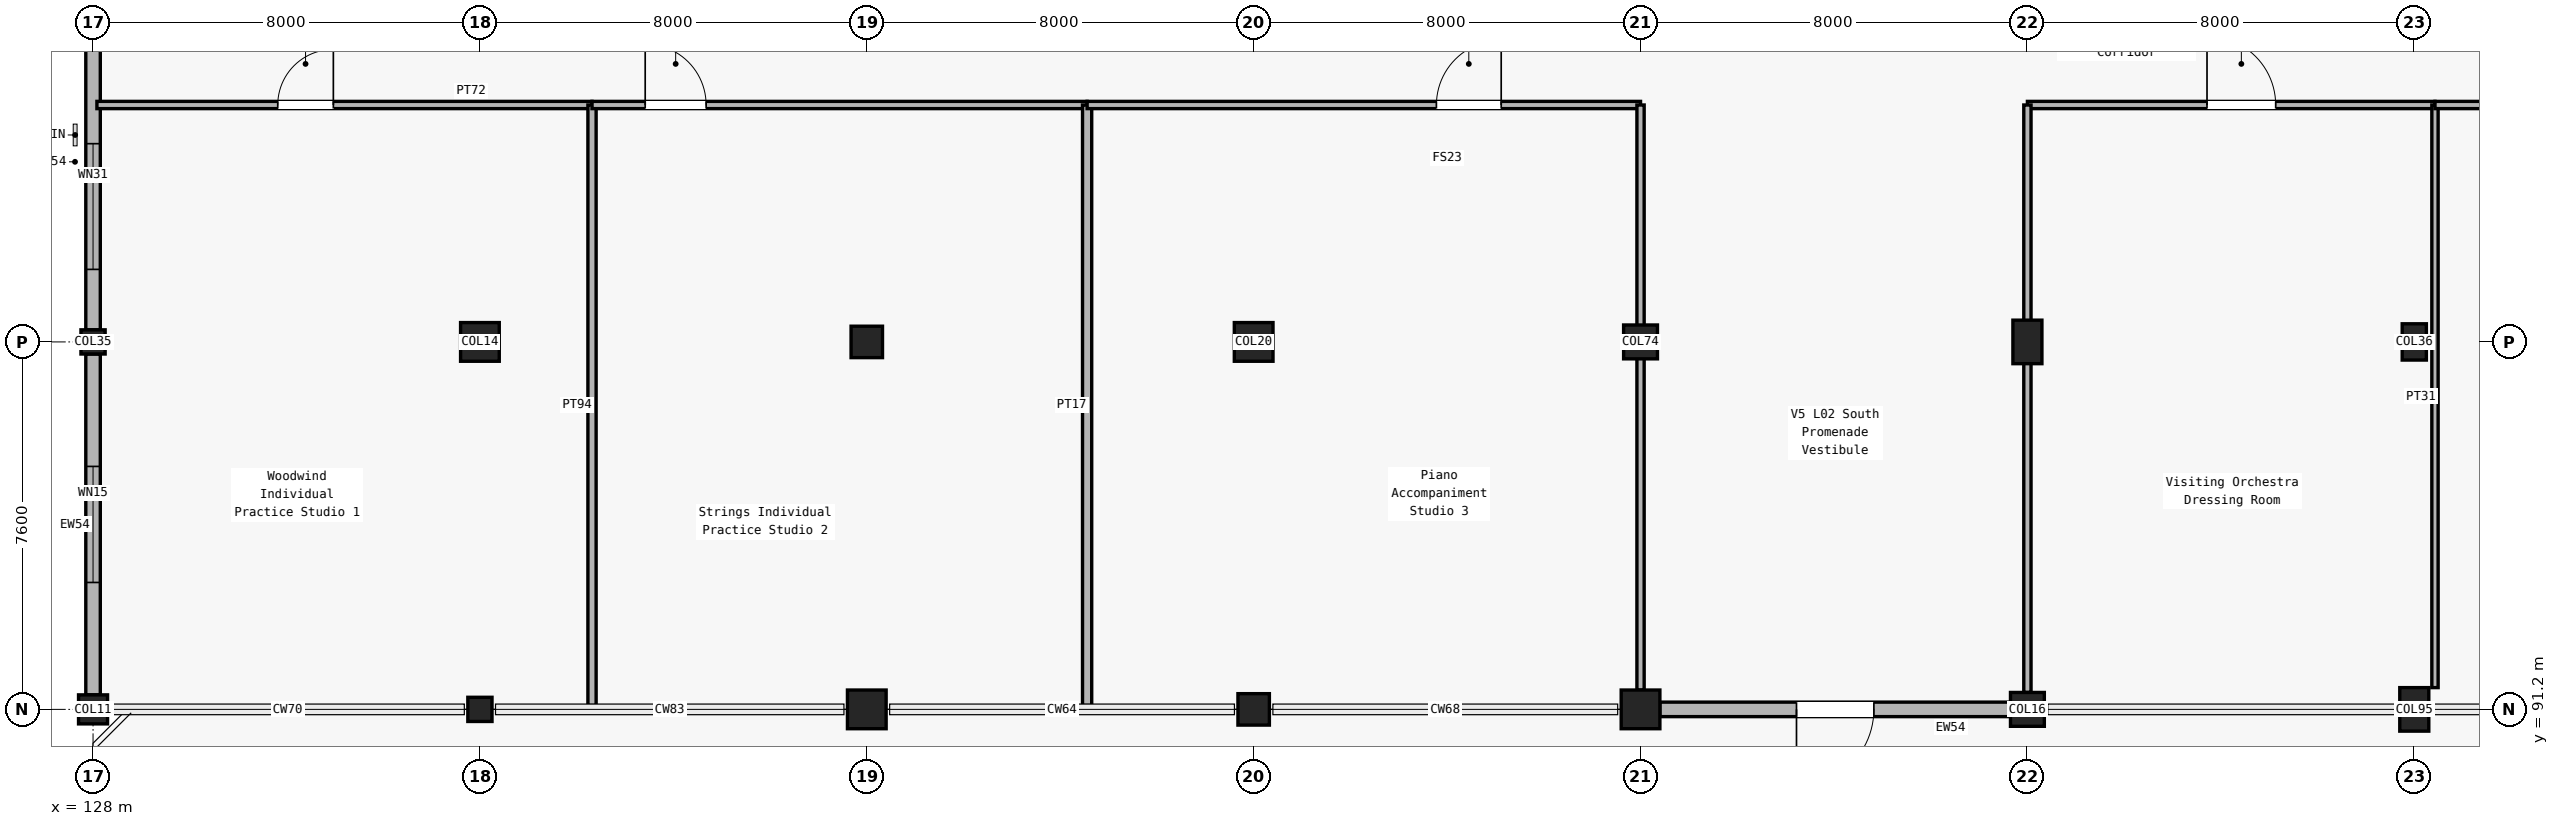
"""IFC4 building model, lengths in metres.
Left out: names, types, materials, properties, quantities, classifications, styles, units other than length and angle.
Written with IfcOpenShell. Run it as: python <this file> out.ifc"""

import sys

from ifc_helpers import new_model, si_unit, direction, frame, frame_2d, origin, origin_2d, place, context, subcontext, project, spatial, rectangle, circle, extrude, element, fill, save


model = new_model("IFC4")
c1 = context("Model", 3, precision=1e-05, world=origin(), true_north=direction((0.0, 1.0)))
c2 = subcontext(c1, "Body", "Model", "MODEL_VIEW")
j1 = project(units=[si_unit("LENGTHUNIT", "METRE"), si_unit("PLANEANGLEUNIT", "RADIAN")], contexts=[c1])
p1 = place(None, origin())
s1 = spatial("IfcSite", under=j1, at=p1, CompositionType="ELEMENT")
p2 = place(p1, origin())
s2 = spatial("IfcBuilding", under=s1, at=p2, CompositionType="ELEMENT")
p3 = place(p2, frame((0.0, 0.0, 10.2)))
s3 = spatial("IfcBuildingStorey", under=s2, at=p3, CompositionType="ELEMENT", Elevation=10.2)
p4 = place(p3, frame((128.0, 91.2, 0.0), z_axis=(0.0, 0.0, 1.0), x_axis=(1.0, 0.0, 0.0)))
e1 = element("IfcColumn", 1, at=p4, inside=s3, PredefinedType="COLUMN", context=c2, shape_type="SweptSolid", body=[
    extrude(rectangle(XDim=0.6, YDim=0.6, at=origin_2d()), origin(), (0.0, 0.0, 1.0), 4.8),
])
for number, where, z_axis, x_axis in (
    (2, (128.0, 98.8, 0.0), (0.0, 0.0, 1.0), (1.0, 0.0, 0.0)),
    (3, (136.0, 91.2, 0.0), (0.0, 0.0, 1.0), (1.0, 0.0, 0.0)),
):
    element("IfcColumn", number, at=place(p3, frame(where, z_axis=z_axis, x_axis=x_axis)), inside=s3, PredefinedType="COLUMN", context=c2, shape_type="SweptSolid", body=[
        extrude(rectangle(XDim=0.5, YDim=0.5, at=origin_2d()), origin(), (0.0, 0.0, 1.0), 4.8),
    ])
for number, where, z_axis, x_axis in (
    (4, (136.0, 98.8, 0.0), (0.0, 0.0, 1.0), (1.0, 0.0, 0.0)),
    (5, (144.0, 91.2, 0.0), (0.0, 0.0, 1.0), (1.0, 0.0, 0.0)),
):
    element("IfcColumn", number, at=place(p3, frame(where, z_axis=z_axis, x_axis=x_axis)), inside=s3, PredefinedType="COLUMN", context=c2, shape_type="SweptSolid", body=[
        extrude(circle(Radius=0.4, at=origin_2d()), origin(), (0.0, 0.0, 1.0), 4.8),
    ])
for number, where, z_axis, x_axis in (
    (6, (144.0, 98.8, 0.0), (0.0, 0.0, 1.0), (1.0, 0.0, 0.0)),
    (7, (152.0, 91.2, 0.0), (0.0, 0.0, 1.0), (1.0, 0.0, 0.0)),
):
    element("IfcColumn", number, at=place(p3, frame(where, z_axis=z_axis, x_axis=x_axis)), inside=s3, PredefinedType="COLUMN", context=c2, shape_type="SweptSolid", body=[
        extrude(circle(Radius=0.325, at=origin_2d()), origin(), (0.0, 0.0, 1.0), 4.8),
    ])
for number, where, z_axis, x_axis in (
    (8, (152.0, 98.8, 0.0), (0.0, 0.0, 1.0), (1.0, 0.0, 0.0)),
    (9, (160.0, 91.2, 0.0), (0.0, 0.0, 1.0), (1.0, 0.0, 0.0)),
):
    element("IfcColumn", number, at=place(p3, frame(where, z_axis=z_axis, x_axis=x_axis)), inside=s3, PredefinedType="COLUMN", context=c2, shape_type="SweptSolid", body=[
        extrude(rectangle(XDim=0.8, YDim=0.8, at=origin_2d()), origin(), (0.0, 0.0, 1.0), 4.8),
    ])
for number, where, z_axis, x_axis in (
    (10, (160.0, 98.8, 0.0), (0.0, 0.0, 1.0), (1.0, 0.0, 0.0)),
    (11, (168.0, 91.2, 0.0), (0.0, 0.0, 1.0), (1.0, 0.0, 0.0)),
):
    element("IfcColumn", number, at=place(p3, frame(where, z_axis=z_axis, x_axis=x_axis)), inside=s3, PredefinedType="COLUMN", context=c2, shape_type="SweptSolid", body=[
        extrude(rectangle(XDim=0.7, YDim=0.7, at=origin_2d()), origin(), (0.0, 0.0, 1.0), 4.8),
    ])
for number, where, z_axis, x_axis in (
    (12, (168.0, 98.8, 0.0), (0.0, 0.0, 1.0), (1.0, 0.0, 0.0)),
    (13, (176.0, 91.2, 0.0), (0.0, 0.0, 1.0), (1.0, 0.0, 0.0)),
):
    element("IfcColumn", number, at=place(p3, frame(where, z_axis=z_axis, x_axis=x_axis)), inside=s3, PredefinedType="COLUMN", context=c2, shape_type="SweptSolid", body=[
        extrude(rectangle(XDim=0.6, YDim=0.9, at=origin_2d()), origin(), (0.0, 0.0, 1.0), 4.8),
    ])
p5 = place(p3, frame((176.0, 98.8, 0.0), z_axis=(0.0, 0.0, 1.0), x_axis=(1.0, 0.0, 0.0)))
e14 = element("IfcColumn", 14, at=p5, inside=s3, PredefinedType="COLUMN", context=c2, shape_type="SweptSolid", body=[
    extrude(rectangle(XDim=0.5, YDim=0.75, at=origin_2d()), origin(), (0.0, 0.0, 1.0), 4.8),
])
p6 = place(p3, frame((167.65, 91.2, 0.0), z_axis=(0.0, 0.0, 1.0), x_axis=(-1.0, 0.0, 0.0)))
e15 = element("IfcWall", 15, at=p6, inside=s3, PredefinedType="SOLIDWALL", context=c2, shape_type="SweptSolid", body=[
    extrude(rectangle(XDim=7.25, YDim=0.3, at=frame_2d((3.625, 0.0))), origin(), (0.0, 0.0, 1.0), 3.91),
])
p7 = place(p6, frame((2.825, 0.0, 0.0)))
e16 = element("IfcOpeningElement", 16, at=p7, cuts=e15, PredefinedType="OPENING", context=c2, shape_type="SweptSolid", body=[
    extrude(rectangle(XDim=1.6, YDim=2.2, at=frame_2d((0.8, 1.1))), frame((0.0, 0.16, 0.0), z_axis=(0.0, -1.0, 0.0), x_axis=(1.0, 0.0, 0.0)), (0.0, 0.0, 1.0), 0.32),
])
p8 = place(p3, frame((128.0, 91.5, 0.0), z_axis=(0.0, 0.0, 1.0), x_axis=(0.0, 1.0, 0.0)))
e17 = element("IfcWall", 17, at=p8, inside=s3, PredefinedType="SOLIDWALL", context=c2, shape_type="SweptSolid", body=[
    extrude(rectangle(XDim=7.05, YDim=0.3, at=frame_2d((3.525, 0.0))), origin(), (0.0, 0.0, 1.0), 4.22),
])
p9 = place(p8, frame((2.325, 0.0, 0.95)))
e18 = element("IfcOpeningElement", 18, at=p9, cuts=e17, PredefinedType="OPENING", context=c2, shape_type="SweptSolid", body=[
    extrude(rectangle(XDim=2.4, YDim=1.65, at=frame_2d((1.2, 0.825))), frame((0.0, 0.16, 0.0), z_axis=(0.0, -1.0, 0.0), x_axis=(1.0, 0.0, 0.0)), (0.0, 0.0, 1.0), 0.32),
])
p10 = place(p3, frame((128.0, 99.05, 0.0), z_axis=(0.0, 0.0, 1.0), x_axis=(0.0, 1.0, 0.0)))
e19 = element("IfcWall", 19, at=p10, inside=s3, PredefinedType="SOLIDWALL", context=c2, shape_type="SweptSolid", body=[
    extrude(rectangle(XDim=6.95, YDim=0.3, at=frame_2d((3.475, 0.0))), origin(), (0.0, 0.0, 1.0), 4.22),
])
p11 = place(p10, frame((1.25, 0.0, 0.95)))
e20 = element("IfcOpeningElement", 20, at=p11, cuts=e19, PredefinedType="OPENING", context=c2, shape_type="SweptSolid", body=[
    extrude(rectangle(XDim=2.6, YDim=1.65, at=frame_2d((1.3, 0.825))), frame((0.0, 0.16, 0.0), z_axis=(0.0, -1.0, 0.0), x_axis=(1.0, 0.0, 0.0)), (0.0, 0.0, 1.0), 0.32),
])
p12 = place(p3, frame((128.08, 103.7, 0.0), z_axis=(0.0, 0.0, 1.0), x_axis=(1.0, 0.0, 0.0)))
e21 = element("IfcWall", 21, at=p12, inside=s3, PredefinedType="PARTITIONING", context=c2, shape_type="SweptSolid", body=[
    extrude(rectangle(XDim=10.238, YDim=0.15, at=frame_2d((5.119, 0.0))), origin(), (0.0, 0.0, 1.0), 3.915),
])
p13 = place(p12, frame((3.739, 0.0, 0.0)))
e22 = element("IfcOpeningElement", 22, at=p13, cuts=e21, PredefinedType="OPENING", context=c2, shape_type="SweptSolid", body=[
    extrude(rectangle(XDim=1.15, YDim=2.15, at=frame_2d((0.575, 1.075))), frame((0.0, 0.085, 0.0), z_axis=(0.0, -1.0, 0.0), x_axis=(1.0, 0.0, 0.0)), (0.0, 0.0, 1.0), 0.17),
])
p14 = place(p3, frame((138.318, 91.28, 0.0), z_axis=(0.0, 0.0, 1.0), x_axis=(0.0, 1.0, 0.0)))
e23 = element("IfcWall", 23, at=p14, inside=s3, PredefinedType="PARTITIONING", context=c2, shape_type="SweptSolid", body=[
    extrude(rectangle(XDim=12.42, YDim=0.17, at=frame_2d((6.21, 0.0))), origin(), (0.0, 0.0, 1.0), 3.695),
])
p15 = place(p3, frame((138.318, 103.7, 0.0), z_axis=(0.0, 0.0, 1.0), x_axis=(1.0, 0.0, 0.0)))
e24 = element("IfcWall", 24, at=p15, inside=s3, PredefinedType="PARTITIONING", context=c2, shape_type="SweptSolid", body=[
    extrude(rectangle(XDim=10.238, YDim=0.15, at=frame_2d((5.119, 0.0))), origin(), (0.0, 0.0, 1.0), 3.745),
])
p16 = place(p15, frame((1.1, 0.0, 0.0)))
e25 = element("IfcOpeningElement", 25, at=p16, cuts=e24, PredefinedType="OPENING", context=c2, shape_type="SweptSolid", body=[
    extrude(rectangle(XDim=1.26, YDim=2.2, at=frame_2d((0.63, 1.1))), frame((0.0, 0.085, 0.0), z_axis=(0.0, -1.0, 0.0), x_axis=(1.0, 0.0, 0.0)), (0.0, 0.0, 1.0), 0.17),
])
p17 = place(p3, frame((148.556, 91.28, 0.0), z_axis=(0.0, 0.0, 1.0), x_axis=(0.0, 1.0, 0.0)))
e26 = element("IfcWall", 26, at=p17, inside=s3, PredefinedType="PARTITIONING", context=c2, shape_type="SweptSolid", body=[
    extrude(rectangle(XDim=12.42, YDim=0.19, at=frame_2d((6.21, 0.0))), origin(), (0.0, 0.0, 1.0), 3.595),
])
p18 = place(p3, frame((148.556, 103.7, 0.0), z_axis=(0.0, 0.0, 1.0), x_axis=(1.0, 0.0, 0.0)))
e27 = element("IfcWall", 27, at=p18, inside=s3, PredefinedType="PARTITIONING", context=c2, shape_type="SweptSolid", body=[
    extrude(rectangle(XDim=11.444, YDim=0.15, at=frame_2d((5.722, 0.0))), origin(), (0.0, 0.0, 1.0), 3.695),
])
p19 = place(p18, frame((7.223, 0.0, 0.0)))
e28 = element("IfcOpeningElement", 28, at=p19, cuts=e27, PredefinedType="OPENING", context=c2, shape_type="SweptSolid", body=[
    extrude(rectangle(XDim=1.34, YDim=2.2, at=frame_2d((0.67, 1.1))), frame((0.0, 0.085, 0.0), z_axis=(0.0, -1.0, 0.0), x_axis=(1.0, 0.0, 0.0)), (0.0, 0.0, 1.0), 0.17),
])
p20 = place(p3, frame((160.0, 91.6, 0.0), z_axis=(0.0, 0.0, 1.0), x_axis=(0.0, 1.0, 0.0)))
e29 = element("IfcWall", 29, at=p20, inside=s3, PredefinedType="PARTITIONING", context=c2, shape_type="SweptSolid", body=[
    extrude(rectangle(XDim=12.1, YDim=0.15, at=frame_2d((6.05, 0.0))), origin(), (0.0, 0.0, 1.0), 2.71),
])
p21 = place(p3, frame((168.0, 103.7, 0.0), z_axis=(0.0, 0.0, 1.0), x_axis=(1.0, 0.0, 0.0)))
e30 = element("IfcWall", 30, at=p21, inside=s3, PredefinedType="PARTITIONING", context=c2, shape_type="SweptSolid", body=[
    extrude(rectangle(XDim=8.428, YDim=0.15, at=frame_2d((4.214, 0.0))), origin(), (0.0, 0.0, 1.0), 3.82),
])
p22 = place(p21, frame((3.714, 0.0, 0.0)))
e31 = element("IfcOpeningElement", 31, at=p22, cuts=e30, PredefinedType="OPENING", context=c2, shape_type="SweptSolid", body=[
    extrude(rectangle(XDim=1.42, YDim=2.2, at=frame_2d((0.71, 1.1))), frame((0.0, 0.085, 0.0), z_axis=(0.0, -1.0, 0.0), x_axis=(1.0, 0.0, 0.0)), (0.0, 0.0, 1.0), 0.17),
])
p23 = place(p3, frame((176.428, 91.65, 0.0), z_axis=(0.0, 0.0, 1.0), x_axis=(0.0, 1.0, 0.0)))
e32 = element("IfcWall", 32, at=p23, inside=s3, PredefinedType="PARTITIONING", context=c2, shape_type="SweptSolid", body=[
    extrude(rectangle(XDim=12.05, YDim=0.13, at=frame_2d((6.025, 0.0))), origin(), (0.0, 0.0, 1.0), 3.645),
])
p24 = place(p3, frame((176.428, 103.7, 0.0), z_axis=(0.0, 0.0, 1.0), x_axis=(1.0, 0.0, 0.0)))
e33 = element("IfcWall", 33, at=p24, inside=s3, PredefinedType="PARTITIONING", context=c2, shape_type="SweptSolid", body=[
    extrude(rectangle(XDim=7.492, YDim=0.15, at=frame_2d((3.746, 0.0))), origin(), (0.0, 0.0, 1.0), 3.77),
])
p25 = place(p24, frame((3.246, 0.0, 0.0)))
e34 = element("IfcOpeningElement", 34, at=p25, cuts=e33, PredefinedType="OPENING", context=c2, shape_type="SweptSolid", body=[
    extrude(rectangle(XDim=0.92, YDim=2.05, at=frame_2d((0.46, 1.025))), frame((0.0, 0.085, 0.0), z_axis=(0.0, -1.0, 0.0), x_axis=(1.0, 0.0, 0.0)), (0.0, 0.0, 1.0), 0.17),
])
p26 = place(p3, frame((168.0, 91.55, 0.0), z_axis=(0.0, 0.0, 1.0), x_axis=(0.0, 1.0, 0.0)))
e35 = element("IfcWall", 35, at=p26, inside=s3, PredefinedType="PARTITIONING", context=c2, shape_type="SweptSolid", body=[
    extrude(rectangle(XDim=12.15, YDim=0.15, at=frame_2d((6.075, 0.0))), origin(), (0.0, 0.0, 1.0), 2.71),
])
p27 = place(p7, origin())
e36 = element("IfcDoor", 36, at=p27, inside=s3, OperationType="SINGLE_SWING_RIGHT", PredefinedType="DOOR", context=c2, shape_type="SweptSolid", body=[
    extrude(rectangle(XDim=1.6, YDim=2.2, at=frame_2d((0.8, 1.1))), frame((0.0, 0.025, 0.0), z_axis=(0.0, -1.0, 0.0), x_axis=(1.0, 0.0, 0.0)), (0.0, 0.0, 1.0), 0.05),
])
fill(e16, e36)
p28 = place(p9, origin())
e37 = element("IfcWindow", 37, at=p28, inside=s3, PartitioningType="DOUBLE_PANEL_VERTICAL", PredefinedType="WINDOW", context=c2, shape_type="SweptSolid", body=[
    extrude(rectangle(XDim=2.4, YDim=1.65, at=frame_2d((1.2, 0.825))), frame((0.0, 0.03, 0.0), z_axis=(0.0, -1.0, 0.0), x_axis=(1.0, 0.0, 0.0)), (0.0, 0.0, 1.0), 0.06),
])
fill(e18, e37)
p29 = place(p11, origin())
e38 = element("IfcWindow", 38, at=p29, inside=s3, PartitioningType="DOUBLE_PANEL_VERTICAL", PredefinedType="WINDOW", context=c2, shape_type="SweptSolid", body=[
    extrude(rectangle(XDim=2.6, YDim=1.65, at=frame_2d((1.3, 0.825))), frame((0.0, 0.03, 0.0), z_axis=(0.0, -1.0, 0.0), x_axis=(1.0, 0.0, 0.0)), (0.0, 0.0, 1.0), 0.06),
])
fill(e20, e38)
p30 = place(p13, origin())
e39 = element("IfcDoor", 39, at=p30, inside=s3, OperationType="SINGLE_SWING_RIGHT", PredefinedType="DOOR", context=c2, shape_type="SweptSolid", body=[
    extrude(rectangle(XDim=1.15, YDim=2.15, at=frame_2d((0.575, 1.075))), frame((0.0, 0.025, 0.0), z_axis=(0.0, -1.0, 0.0), x_axis=(1.0, 0.0, 0.0)), (0.0, 0.0, 1.0), 0.05),
])
fill(e22, e39)
p31 = place(p16, origin())
e40 = element("IfcDoor", 40, at=p31, inside=s3, OperationType="SINGLE_SWING_LEFT", PredefinedType="DOOR", context=c2, shape_type="SweptSolid", body=[
    extrude(rectangle(XDim=1.26, YDim=2.2, at=frame_2d((0.63, 1.1))), frame((0.0, 0.025, 0.0), z_axis=(0.0, -1.0, 0.0), x_axis=(1.0, 0.0, 0.0)), (0.0, 0.0, 1.0), 0.05),
])
fill(e25, e40)
p32 = place(p19, origin())
e41 = element("IfcDoor", 41, at=p32, inside=s3, OperationType="SINGLE_SWING_RIGHT", PredefinedType="DOOR", context=c2, shape_type="SweptSolid", body=[
    extrude(rectangle(XDim=1.34, YDim=2.2, at=frame_2d((0.67, 1.1))), frame((0.0, 0.025, 0.0), z_axis=(0.0, -1.0, 0.0), x_axis=(1.0, 0.0, 0.0)), (0.0, 0.0, 1.0), 0.05),
])
fill(e28, e41)
p33 = place(p22, origin())
e42 = element("IfcDoor", 42, at=p33, inside=s3, OperationType="SINGLE_SWING_LEFT", PredefinedType="DOOR", context=c2, shape_type="SweptSolid", body=[
    extrude(rectangle(XDim=1.42, YDim=2.2, at=frame_2d((0.71, 1.1))), frame((0.0, 0.025, 0.0), z_axis=(0.0, -1.0, 0.0), x_axis=(1.0, 0.0, 0.0)), (0.0, 0.0, 1.0), 0.05),
])
fill(e31, e42)
save(model, sys.argv[1])
